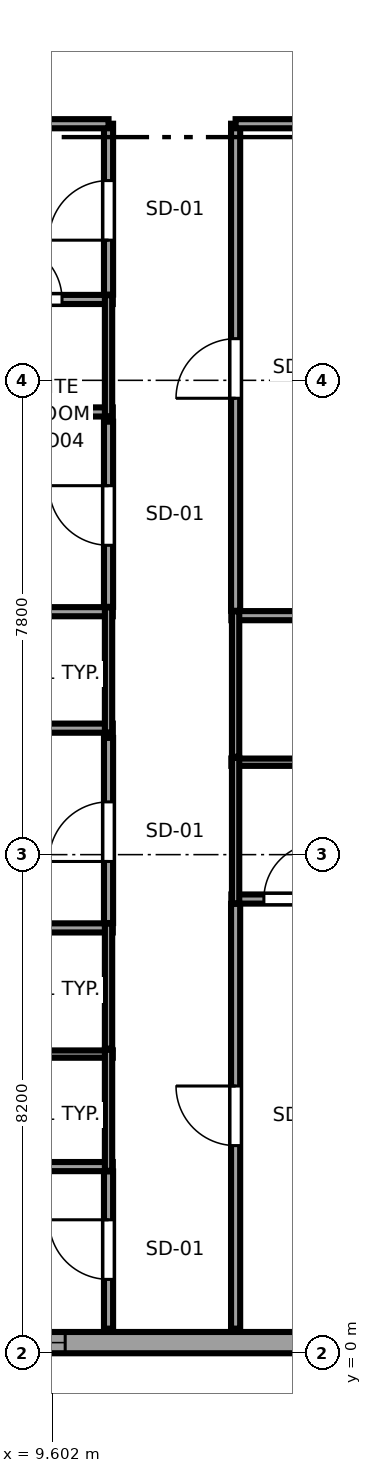
"""IFC4 building model, lengths in metres.
Left out: names, types, materials, properties, quantities, classifications, styles, units other than length and angle.
Written with IfcOpenShell. Run it as: python <this file> out.ifc"""

import sys

from ifc_helpers import new_model, si_unit, direction, frame, frame_2d, origin, place, context, subcontext, project, spatial, rectangle, extrude, source, transform, mapped, element, fill, save


model = new_model("IFC4")
c1 = context("Model", 3, precision=1e-05, world=origin(), true_north=direction((0.0, 1.0)))
c2 = subcontext(c1, "Body", "Model", "MODEL_VIEW")
j1 = project(units=[si_unit("LENGTHUNIT", "METRE"), si_unit("PLANEANGLEUNIT", "RADIAN")], contexts=[c1])
p1 = place(None, origin())
s1 = spatial("IfcSite", under=j1, at=p1, CompositionType="ELEMENT")
p2 = place(p1, origin())
s2 = spatial("IfcBuilding", under=s1, at=p2, CompositionType="ELEMENT")
p3 = place(p2, frame((0.0, 0.0, 60.4)))
s3 = spatial("IfcBuildingStorey", under=s2, at=p3, CompositionType="ELEMENT", Elevation=60.4)
p4 = place(p3, frame((4.617, 0.175, 0.0), z_axis=(0.0, 0.0, 1.0), x_axis=(1.0, 0.0, 0.0)))
e1 = element("IfcWall", 1, at=p4, inside=s3, PredefinedType="SOLIDWALL", context=c2, shape_type="SweptSolid", body=[
    extrude(rectangle(XDim=18.008, YDim=0.35, at=frame_2d((9.004, 0.0))), origin(), (0.0, 0.0, 1.0), 3.37),
])
p5 = place(p4, frame((14.407, 0.0, 0.68)))
e2 = element("IfcOpeningElement", 2, at=p5, cuts=e1, PredefinedType="OPENING", context=c2, shape_type="SweptSolid", body=[
    extrude(rectangle(XDim=1.8, YDim=1.85, at=frame_2d((0.9, 0.925))), frame((0.0, 0.185, 0.0), z_axis=(0.0, -1.0, 0.0), x_axis=(1.0, 0.0, 0.0)), (0.0, 0.0, 1.0), 0.37),
])
p6 = place(p4, frame((3.7, 0.0, 0.62)))
e3 = element("IfcOpeningElement", 3, at=p6, cuts=e1, PredefinedType="OPENING", context=c2, shape_type="SweptSolid", body=[
    extrude(rectangle(XDim=1.5, YDim=1.55, at=frame_2d((0.75, 0.775))), frame((0.0, 0.185, 0.0), z_axis=(0.0, -1.0, 0.0), x_axis=(1.0, 0.0, 0.0)), (0.0, 0.0, 1.0), 0.37),
])
p7 = place(p3, frame((8.01, 3.07, 0.0), z_axis=(0.0, 0.0, 1.0), x_axis=(1.0, 0.0, 0.0)))
e4 = element("IfcWall", 4, at=p7, inside=s3, PredefinedType="PARTITIONING", context=c2, shape_type="SweptSolid", body=[
    extrude(rectangle(XDim=2.59, YDim=0.15, at=frame_2d((1.295, 0.0))), origin(), (0.0, 0.0, 1.0), 3.37),
])
p8 = place(p3, frame((8.01, 4.92, 0.0), z_axis=(0.0, 0.0, 1.0), x_axis=(1.0, 0.0, 0.0)))
e5 = element("IfcWall", 5, at=p8, inside=s3, PredefinedType="PLUMBINGWALL", context=c2, shape_type="SweptSolid", body=[
    extrude(rectangle(XDim=2.59, YDim=0.12, at=frame_2d((1.295, 0.0))), origin(), (0.0, 0.0, 1.0), 3.37),
])
p9 = place(p3, frame((10.53, 3.0, 0.0), z_axis=(0.0, 0.0, 1.0), x_axis=(0.0, 1.0, 0.0)))
e6 = element("IfcWall", 6, at=p9, inside=s3, PredefinedType="PLUMBINGWALL", context=c2, shape_type="SweptSolid", body=[
    extrude(rectangle(XDim=1.99, YDim=0.12, at=frame_2d((0.995, 0.0))), origin(), (0.0, 0.0, 1.0), 3.37),
])
p10 = place(p3, frame((8.01, 6.995, 0.0), z_axis=(0.0, 0.0, 1.0), x_axis=(1.0, 0.0, 0.0)))
e7 = element("IfcWall", 7, at=p10, inside=s3, PredefinedType="PARTITIONING", context=c2, shape_type="SweptSolid", body=[
    extrude(rectangle(XDim=2.59, YDim=0.15, at=frame_2d((1.295, 0.0))), origin(), (0.0, 0.0, 1.0), 3.37),
])
p11 = place(p3, frame((10.53, 5.01, 0.0), z_axis=(0.0, 0.0, 1.0), x_axis=(0.0, 1.0, 0.0)))
e8 = element("IfcWall", 8, at=p11, inside=s3, PredefinedType="PLUMBINGWALL", context=c2, shape_type="SweptSolid", body=[
    extrude(rectangle(XDim=2.055, YDim=0.12, at=frame_2d((1.027, 0.0))), origin(), (0.0, 0.0, 1.0), 3.37),
])
p12 = place(p3, frame((0.405, 10.28, 0.0), z_axis=(0.0, 0.0, 1.0), x_axis=(1.0, 0.0, 0.0)))
e9 = element("IfcWall", 9, at=p12, inside=s3, PredefinedType="PARTITIONING", context=c2, shape_type="SweptSolid", body=[
    extrude(rectangle(XDim=10.195, YDim=0.15, at=frame_2d((5.098, 0.0))), origin(), (0.0, 0.0, 1.0), 3.37),
])
p13 = place(p3, frame((8.01, 12.195, 0.0), z_axis=(0.0, 0.0, 1.0), x_axis=(1.0, 0.0, 0.0)))
e10 = element("IfcWall", 10, at=p13, inside=s3, PredefinedType="PARTITIONING", context=c2, shape_type="SweptSolid", body=[
    extrude(rectangle(XDim=2.59, YDim=0.15, at=frame_2d((1.295, 0.0))), origin(), (0.0, 0.0, 1.0), 3.37),
])
p14 = place(p3, frame((10.53, 10.21, 0.0), z_axis=(0.0, 0.0, 1.0), x_axis=(0.0, 1.0, 0.0)))
e11 = element("IfcWall", 11, at=p14, inside=s3, PredefinedType="PLUMBINGWALL", context=c2, shape_type="SweptSolid", body=[
    extrude(rectangle(XDim=2.055, YDim=0.12, at=frame_2d((1.027, 0.0))), origin(), (0.0, 0.0, 1.0), 3.37),
])
p15 = place(p3, frame((0.405, 15.48, 0.0), z_axis=(0.0, 0.0, 1.0), x_axis=(1.0, 0.0, 0.0)))
e12 = element("IfcWall", 12, at=p15, inside=s3, PredefinedType="PARTITIONING", context=c2, shape_type="SweptSolid", body=[
    extrude(rectangle(XDim=10.195, YDim=0.15, at=frame_2d((5.098, 0.0))), origin(), (0.0, 0.0, 1.0), 3.37),
])
p16 = place(p3, frame((8.01, 17.33, 0.0), z_axis=(0.0, 0.0, 1.0), x_axis=(1.0, 0.0, 0.0)))
e13 = element("IfcWall", 13, at=p16, inside=s3, PredefinedType="PARTITIONING", context=c2, shape_type="SweptSolid", body=[
    extrude(rectangle(XDim=2.59, YDim=0.15, at=frame_2d((1.295, 0.0))), origin(), (0.0, 0.0, 1.0), 3.37),
])
p17 = place(p16, frame((0.835, 0.0, 0.0)))
e14 = element("IfcOpeningElement", 14, at=p17, cuts=e13, PredefinedType="OPENING", context=c2, shape_type="SweptSolid", body=[
    extrude(rectangle(XDim=0.92, YDim=2.01, at=frame_2d((0.46, 1.005))), frame((0.0, 0.085, 0.0), z_axis=(0.0, -1.0, 0.0), x_axis=(1.0, 0.0, 0.0)), (0.0, 0.0, 1.0), 0.17),
])
p18 = place(p3, frame((10.53, 15.41, 0.0), z_axis=(0.0, 0.0, 1.0), x_axis=(0.0, 1.0, 0.0)))
e15 = element("IfcWall", 15, at=p18, inside=s3, PredefinedType="PLUMBINGWALL", context=c2, shape_type="SweptSolid", body=[
    extrude(rectangle(XDim=1.99, YDim=0.12, at=frame_2d((0.995, 0.0))), origin(), (0.0, 0.0, 1.0), 3.37),
])
p19 = place(p3, frame((12.55, 7.47, 0.0), z_axis=(0.0, 0.0, 1.0), x_axis=(1.0, 0.0, 0.0)))
e16 = element("IfcWall", 16, at=p19, inside=s3, PredefinedType="PARTITIONING", context=c2, shape_type="SweptSolid", body=[
    extrude(rectangle(XDim=2.59, YDim=0.15, at=frame_2d((1.295, 0.0))), origin(), (0.0, 0.0, 1.0), 3.37),
])
p20 = place(p19, frame((0.535, 0.0, 0.0)))
e17 = element("IfcOpeningElement", 17, at=p20, cuts=e16, PredefinedType="OPENING", context=c2, shape_type="SweptSolid", body=[
    extrude(rectangle(XDim=0.92, YDim=2.01, at=frame_2d((0.46, 1.005))), frame((0.0, 0.085, 0.0), z_axis=(0.0, -1.0, 0.0), x_axis=(1.0, 0.0, 0.0)), (0.0, 0.0, 1.0), 0.17),
])
p21 = place(p3, frame((12.55, 9.72, 0.0), z_axis=(0.0, 0.0, 1.0), x_axis=(1.0, 0.0, 0.0)))
e18 = element("IfcWall", 18, at=p21, inside=s3, PredefinedType="PLUMBINGWALL", context=c2, shape_type="SweptSolid", body=[
    extrude(rectangle(XDim=2.59, YDim=0.12, at=frame_2d((1.295, 0.0))), origin(), (0.0, 0.0, 1.0), 3.37),
])
p22 = place(p3, frame((12.62, 7.4, 0.0), z_axis=(0.0, 0.0, 1.0), x_axis=(0.0, 1.0, 0.0)))
e19 = element("IfcWall", 19, at=p22, inside=s3, PredefinedType="PLUMBINGWALL", context=c2, shape_type="SweptSolid", body=[
    extrude(rectangle(XDim=2.39, YDim=0.12, at=frame_2d((1.195, 0.0))), origin(), (0.0, 0.0, 1.0), 3.37),
])
p23 = place(p3, frame((12.55, 12.13, 0.0), z_axis=(0.0, 0.0, 1.0), x_axis=(1.0, 0.0, 0.0)))
e20 = element("IfcWall", 20, at=p23, inside=s3, PredefinedType="PARTITIONING", context=c2, shape_type="SweptSolid", body=[
    extrude(rectangle(XDim=2.59, YDim=0.15, at=frame_2d((1.295, 0.0))), origin(), (0.0, 0.0, 1.0), 3.37),
])
p24 = place(p3, frame((12.62, 9.81, 0.0), z_axis=(0.0, 0.0, 1.0), x_axis=(0.0, 1.0, 0.0)))
e21 = element("IfcWall", 21, at=p24, inside=s3, PredefinedType="PLUMBINGWALL", context=c2, shape_type="SweptSolid", body=[
    extrude(rectangle(XDim=2.39, YDim=0.12, at=frame_2d((1.195, 0.0))), origin(), (0.0, 0.0, 1.0), 3.37),
])
p25 = place(p3, frame((10.53, 0.405, 0.0), z_axis=(0.0, 0.0, 1.0), x_axis=(0.0, 1.0, 0.0)))
e22 = element("IfcWall", 22, at=p25, inside=s3, PredefinedType="PARTITIONING", context=c2, shape_type="SweptSolid", body=[
    extrude(rectangle(XDim=2.585, YDim=0.15, at=frame_2d((1.292, 0.0))), origin(), (0.0, 0.0, 1.0), 3.37),
])
p26 = place(p25, frame((0.81, 0.0, 0.0)))
e23 = element("IfcOpeningElement", 23, at=p26, cuts=e22, PredefinedType="OPENING", context=c2, shape_type="SweptSolid", body=[
    extrude(rectangle(XDim=0.98, YDim=2.12, at=frame_2d((0.49, 1.06))), frame((0.0, 0.085, 0.0), z_axis=(0.0, -1.0, 0.0), x_axis=(1.0, 0.0, 0.0)), (0.0, 0.0, 1.0), 0.17),
])
p27 = place(p3, frame((10.53, 7.075, 0.0), z_axis=(0.0, 0.0, 1.0), x_axis=(0.0, 1.0, 0.0)))
e24 = element("IfcWall", 24, at=p27, inside=s3, PredefinedType="PARTITIONING", context=c2, shape_type="SweptSolid", body=[
    extrude(rectangle(XDim=3.045, YDim=0.15, at=frame_2d((1.522, 0.0))), origin(), (0.0, 0.0, 1.0), 3.37),
])
p28 = place(p27, frame((1.012, 0.0, 0.0)))
e25 = element("IfcOpeningElement", 25, at=p28, cuts=e24, PredefinedType="OPENING", context=c2, shape_type="SweptSolid", body=[
    extrude(rectangle(XDim=0.98, YDim=2.12, at=frame_2d((0.49, 1.06))), frame((0.0, 0.085, 0.0), z_axis=(0.0, -1.0, 0.0), x_axis=(1.0, 0.0, 0.0)), (0.0, 0.0, 1.0), 0.17),
])
p29 = place(p3, frame((10.53, 12.275, 0.0), z_axis=(0.0, 0.0, 1.0), x_axis=(0.0, 1.0, 0.0)))
e26 = element("IfcWall", 26, at=p29, inside=s3, PredefinedType="PARTITIONING", context=c2, shape_type="SweptSolid", body=[
    extrude(rectangle(XDim=3.045, YDim=0.15, at=frame_2d((1.522, 0.0))), origin(), (0.0, 0.0, 1.0), 3.37),
])
p30 = place(p29, frame((1.012, 0.0, 0.0)))
e27 = element("IfcOpeningElement", 27, at=p30, cuts=e26, PredefinedType="OPENING", context=c2, shape_type="SweptSolid", body=[
    extrude(rectangle(XDim=0.98, YDim=2.12, at=frame_2d((0.49, 1.06))), frame((0.0, 0.085, 0.0), z_axis=(0.0, -1.0, 0.0), x_axis=(1.0, 0.0, 0.0)), (0.0, 0.0, 1.0), 0.17),
])
p31 = place(p3, frame((10.53, 17.41, 0.0), z_axis=(0.0, 0.0, 1.0), x_axis=(0.0, 1.0, 0.0)))
e28 = element("IfcWall", 28, at=p31, inside=s3, PredefinedType="PARTITIONING", context=c2, shape_type="SweptSolid", body=[
    extrude(rectangle(XDim=2.81, YDim=0.15, at=frame_2d((1.405, 0.0))), origin(), (0.0, 0.0, 1.0), 3.37),
])
p32 = place(p31, frame((0.895, 0.0, 0.0)))
e29 = element("IfcOpeningElement", 29, at=p32, cuts=e28, PredefinedType="OPENING", context=c2, shape_type="SweptSolid", body=[
    extrude(rectangle(XDim=0.98, YDim=2.12, at=frame_2d((0.49, 1.06))), frame((0.0, 0.085, 0.0), z_axis=(0.0, -1.0, 0.0), x_axis=(1.0, 0.0, 0.0)), (0.0, 0.0, 1.0), 0.17),
])
p33 = place(p3, frame((0.405, 20.22, 0.0), z_axis=(0.0, 0.0, 1.0), x_axis=(1.0, 0.0, 0.0)))
e30 = element("IfcWall", 30, at=p33, inside=s3, PredefinedType="PARTITIONING", context=c2, shape_type="SweptSolid", body=[
    extrude(rectangle(XDim=10.125, YDim=0.15, at=frame_2d((5.062, 0.0))), origin(), (0.0, 0.0, 1.0), 3.37),
])
p34 = place(p3, frame((12.62, 0.405, 0.0), z_axis=(0.0, 0.0, 1.0), x_axis=(0.0, 1.0, 0.0)))
e31 = element("IfcWall", 31, at=p34, inside=s3, PredefinedType="PARTITIONING", context=c2, shape_type="SweptSolid", body=[
    extrude(rectangle(XDim=6.985, YDim=0.15, at=frame_2d((3.492, 0.0))), origin(), (0.0, 0.0, 1.0), 3.37),
])
p35 = place(p34, frame((3.01, 0.0, 0.0)))
e32 = element("IfcOpeningElement", 32, at=p35, cuts=e31, PredefinedType="OPENING", context=c2, shape_type="SweptSolid", body=[
    extrude(rectangle(XDim=0.98, YDim=2.12, at=frame_2d((0.49, 1.06))), frame((0.0, 0.085, 0.0), z_axis=(0.0, -1.0, 0.0), x_axis=(1.0, 0.0, 0.0)), (0.0, 0.0, 1.0), 0.17),
])
p36 = place(p3, frame((12.62, 12.21, 0.0), z_axis=(0.0, 0.0, 1.0), x_axis=(0.0, 1.0, 0.0)))
e33 = element("IfcWall", 33, at=p36, inside=s3, PredefinedType="PARTITIONING", context=c2, shape_type="SweptSolid", body=[
    extrude(rectangle(XDim=8.01, YDim=0.15, at=frame_2d((4.005, 0.0))), origin(), (0.0, 0.0, 1.0), 3.37),
])
p37 = place(p36, frame((3.495, 0.0, 0.0)))
e34 = element("IfcOpeningElement", 34, at=p37, cuts=e33, PredefinedType="OPENING", context=c2, shape_type="SweptSolid", body=[
    extrude(rectangle(XDim=0.98, YDim=2.12, at=frame_2d((0.49, 1.06))), frame((0.0, 0.085, 0.0), z_axis=(0.0, -1.0, 0.0), x_axis=(1.0, 0.0, 0.0)), (0.0, 0.0, 1.0), 0.17),
])
p38 = place(p3, frame((12.62, 20.22, 0.0), z_axis=(0.0, 0.0, 1.0), x_axis=(1.0, 0.0, 0.0)))
e35 = element("IfcWall", 35, at=p38, inside=s3, PredefinedType="PARTITIONING", context=c2, shape_type="SweptSolid", body=[
    extrude(rectangle(XDim=9.73, YDim=0.15, at=frame_2d((4.865, 0.0))), origin(), (0.0, 0.0, 1.0), 2.954),
])
m1 = source(origin(), c2, "Body", "SweptSolid", [
    extrude(rectangle(XDim=1.5, YDim=1.55, at=frame_2d((0.75, 0.775))), frame((0.0, 0.09, 0.0), z_axis=(0.0, -1.0, 0.0), x_axis=(1.0, 0.0, 0.0)), (0.0, 0.0, 1.0), 0.06),
])
p39 = place(p6, origin())
e36 = element("IfcWindow", 36, at=p39, inside=s3, PartitioningType="SINGLE_PANEL", PredefinedType="WINDOW", context=c2, shape_type="MappedRepresentation", body=[
    mapped(m1, transform((0.0, 0.0, 0.0), x_axis=(1.0, 0.0, 0.0), y_axis=(0.0, 1.0, 0.0), z_axis=(0.0, 0.0, 1.0), scale=1.0)),
])
fill(e3, e36)
m2 = source(origin(), c2, "Body", "SweptSolid", [
    extrude(rectangle(XDim=0.92, YDim=2.01, at=frame_2d((0.46, 1.005))), frame((0.0, 0.025, 0.0), z_axis=(0.0, -1.0, 0.0), x_axis=(1.0, 0.0, 0.0)), (0.0, 0.0, 1.0), 0.05),
])
p40 = place(p17, origin())
e37 = element("IfcDoor", 37, at=p40, inside=s3, OperationType="SINGLE_SWING_LEFT", PredefinedType="DOOR", context=c2, shape_type="MappedRepresentation", body=[
    mapped(m2, transform((0.0, 0.0, 0.0), x_axis=(1.0, 0.0, 0.0), y_axis=(0.0, 1.0, 0.0), z_axis=(0.0, 0.0, 1.0), scale=1.0)),
])
fill(e14, e37)
p41 = place(p20, origin())
e38 = element("IfcDoor", 38, at=p41, inside=s3, OperationType="SINGLE_SWING_RIGHT", PredefinedType="DOOR", context=c2, shape_type="MappedRepresentation", body=[
    mapped(m2, transform((0.0, 0.0, 0.0), x_axis=(1.0, 0.0, 0.0), y_axis=(0.0, 1.0, 0.0), z_axis=(0.0, 0.0, 1.0), scale=1.0)),
])
fill(e17, e38)
m3 = source(origin(), c2, "Body", "SweptSolid", [
    extrude(rectangle(XDim=0.98, YDim=2.12, at=frame_2d((0.49, 1.06))), frame((0.0, 0.025, 0.0), z_axis=(0.0, -1.0, 0.0), x_axis=(1.0, 0.0, 0.0)), (0.0, 0.0, 1.0), 0.05),
])
p42 = place(p26, origin())
e39 = element("IfcDoor", 39, at=p42, inside=s3, OperationType="SINGLE_SWING_RIGHT", PredefinedType="DOOR", context=c2, shape_type="MappedRepresentation", body=[
    mapped(m3, transform((0.0, 0.0, 0.0), x_axis=(1.0, 0.0, 0.0), y_axis=(0.0, 1.0, 0.0), z_axis=(0.0, 0.0, 1.0), scale=1.0)),
])
fill(e23, e39)
p43 = place(p28, origin())
e40 = element("IfcDoor", 40, at=p43, inside=s3, OperationType="SINGLE_SWING_LEFT", PredefinedType="DOOR", context=c2, shape_type="MappedRepresentation", body=[
    mapped(m3, transform((0.0, 0.0, 0.0), x_axis=(1.0, 0.0, 0.0), y_axis=(0.0, 1.0, 0.0), z_axis=(0.0, 0.0, 1.0), scale=1.0)),
])
fill(e25, e40)
p44 = place(p30, origin())
e41 = element("IfcDoor", 41, at=p44, inside=s3, OperationType="SINGLE_SWING_RIGHT", PredefinedType="DOOR", context=c2, shape_type="MappedRepresentation", body=[
    mapped(m3, transform((0.0, 0.0, 0.0), x_axis=(1.0, 0.0, 0.0), y_axis=(0.0, 1.0, 0.0), z_axis=(0.0, 0.0, 1.0), scale=1.0)),
])
fill(e27, e41)
p45 = place(p32, origin())
e42 = element("IfcDoor", 42, at=p45, inside=s3, OperationType="SINGLE_SWING_LEFT", PredefinedType="DOOR", context=c2, shape_type="MappedRepresentation", body=[
    mapped(m3, transform((0.0, 0.0, 0.0), x_axis=(1.0, 0.0, 0.0), y_axis=(0.0, 1.0, 0.0), z_axis=(0.0, 0.0, 1.0), scale=1.0)),
])
fill(e29, e42)
p46 = place(p35, origin())
e43 = element("IfcDoor", 43, at=p46, inside=s3, OperationType="SINGLE_SWING_RIGHT", PredefinedType="DOOR", context=c2, shape_type="MappedRepresentation", body=[
    mapped(m3, transform((0.0, 0.0, 0.0), x_axis=(1.0, 0.0, 0.0), y_axis=(0.0, 1.0, 0.0), z_axis=(0.0, 0.0, 1.0), scale=1.0)),
])
fill(e32, e43)
p47 = place(p37, origin())
e44 = element("IfcDoor", 44, at=p47, inside=s3, OperationType="SINGLE_SWING_LEFT", PredefinedType="DOOR", context=c2, shape_type="MappedRepresentation", body=[
    mapped(m3, transform((0.0, 0.0, 0.0), x_axis=(1.0, 0.0, 0.0), y_axis=(0.0, 1.0, 0.0), z_axis=(0.0, 0.0, 1.0), scale=1.0)),
])
fill(e34, e44)
save(model, sys.argv[1])
